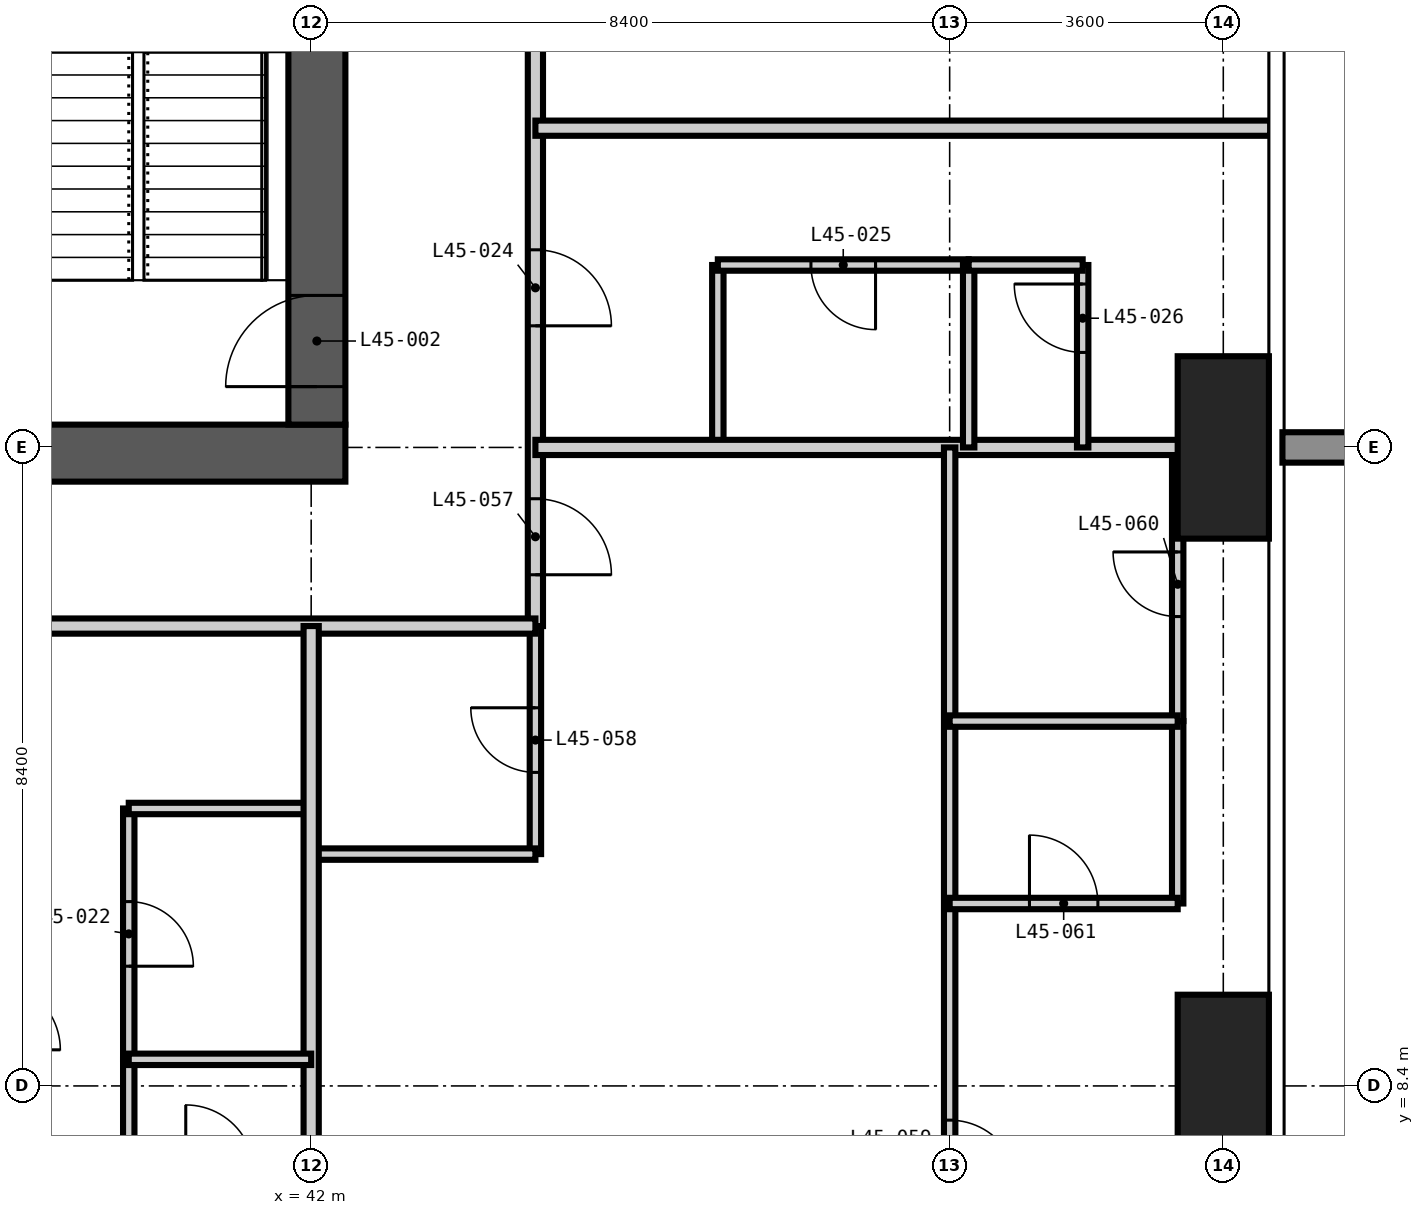
"""IFC4 building model, lengths in metres.
Left out: names, types, materials, properties, quantities, classifications, styles, units other than length and angle.
Written with IfcOpenShell. Run it as: python <this file> out.ifc"""

import sys

from ifc_helpers import new_model, si_unit, direction, frame, frame_2d, origin, origin_2d, place, context, subcontext, project, spatial, rectangle, extrude, element, fill, save


model = new_model("IFC4")
c1 = context("Model", 3, precision=1e-05, world=origin(), true_north=direction((0.0, 1.0)))
c2 = subcontext(c1, "Body", "Model", "MODEL_VIEW")
j1 = project(units=[si_unit("LENGTHUNIT", "METRE"), si_unit("PLANEANGLEUNIT", "RADIAN")], contexts=[c1])
p1 = place(None, origin())
s1 = spatial("IfcSite", under=j1, at=p1, CompositionType="ELEMENT")
p2 = place(p1, origin())
s2 = spatial("IfcBuilding", under=s1, at=p2, CompositionType="ELEMENT")
p3 = place(p2, frame((0.0, 0.0, 177.0)))
s3 = spatial("IfcBuildingStorey", under=s2, at=p3, CompositionType="ELEMENT", Elevation=177.0)
for number, where, z_axis, x_axis in (
    (1, (54.0, 8.4, -0.35), (0.0, 0.0, 1.0), (1.0, 0.0, 0.0)),
    (2, (54.0, 16.8, -0.35), (0.0, 0.0, 1.0), (1.0, 0.0, 0.0)),
):
    element("IfcColumn", number, at=place(p3, frame(where, z_axis=z_axis, x_axis=x_axis)), inside=s3, PredefinedType="COLUMN", context=c2, shape_type="SweptSolid", body=[
        extrude(rectangle(XDim=1.2, YDim=2.4, at=origin_2d()), origin(), (0.0, 0.0, 1.0), 3.6),
    ])
p4 = place(p3, frame((16.35, 16.725, -0.35), z_axis=(0.0, 0.0, 1.0), x_axis=(1.0, 0.0, 0.0)))
e3 = element("IfcWall", 3, at=p4, inside=s3, PredefinedType="SHEAR", context=c2, shape_type="SweptSolid", body=[
    extrude(rectangle(XDim=26.1, YDim=0.75, at=frame_2d((13.05, 0.0))), origin(), (0.0, 0.0, 1.0), 3.6),
])
p5 = place(p4, frame((12.55, 0.0, 0.35)))
e4 = element("IfcOpeningElement", 4, at=p5, cuts=e3, PredefinedType="OPENING", context=c2, shape_type="SweptSolid", body=[
    extrude(rectangle(XDim=1.0, YDim=2.1, at=frame_2d((0.5, 1.05))), frame((0.0, 0.385, 0.0), z_axis=(0.0, -1.0, 0.0), x_axis=(1.0, 0.0, 0.0)), (0.0, 0.0, 1.0), 0.77),
])
p6 = place(p4, frame((18.85, 0.0, 0.35)))
e5 = element("IfcOpeningElement", 5, at=p6, cuts=e3, PredefinedType="OPENING", context=c2, shape_type="SweptSolid", body=[
    extrude(rectangle(XDim=1.0, YDim=2.1, at=frame_2d((0.5, 1.05))), frame((0.0, 0.385, 0.0), z_axis=(0.0, -1.0, 0.0), x_axis=(1.0, 0.0, 0.0)), (0.0, 0.0, 1.0), 0.77),
])
p7 = place(p3, frame((42.075, 17.1, -0.35), z_axis=(0.0, 0.0, 1.0), x_axis=(0.0, 1.0, 0.0)))
e6 = element("IfcWall", 6, at=p7, inside=s3, PredefinedType="SHEAR", context=c2, shape_type="SweptSolid", body=[
    extrude(rectangle(XDim=24.6, YDim=0.75, at=frame_2d((12.3, 0.0))), origin(), (0.0, 0.0, 1.0), 3.6),
])
p8 = place(p7, frame((0.5, 0.0, 0.35)))
e7 = element("IfcOpeningElement", 7, at=p8, cuts=e6, PredefinedType="OPENING", context=c2, shape_type="SweptSolid", body=[
    extrude(rectangle(XDim=1.2, YDim=2.2, at=frame_2d((0.6, 1.1))), frame((0.0, 0.385, 0.0), z_axis=(0.0, -1.0, 0.0), x_axis=(1.0, 0.0, 0.0)), (0.0, 0.0, 1.0), 0.77),
])
p9 = place(p7, frame((11.8, 0.0, 0.35)))
e8 = element("IfcOpeningElement", 8, at=p9, cuts=e6, PredefinedType="OPENING", context=c2, shape_type="SweptSolid", body=[
    extrude(rectangle(XDim=1.0, YDim=2.1, at=frame_2d((0.5, 1.05))), frame((0.0, 0.385, 0.0), z_axis=(0.0, -1.0, 0.0), x_axis=(1.0, 0.0, 0.0)), (0.0, 0.0, 1.0), 0.77),
])
p10 = place(p7, frame((20.2, 0.0, 0.35)))
e9 = element("IfcOpeningElement", 9, at=p10, cuts=e6, PredefinedType="OPENING", context=c2, shape_type="SweptSolid", body=[
    extrude(rectangle(XDim=1.0, YDim=2.1, at=frame_2d((0.5, 1.05))), frame((0.0, 0.385, 0.0), z_axis=(0.0, -1.0, 0.0), x_axis=(1.0, 0.0, 0.0)), (0.0, 0.0, 1.0), 0.77),
])
p11 = place(p3, frame((39.6, 8.75, 0.0), z_axis=(0.0, 0.0, 1.0), x_axis=(0.0, 1.0, 0.0)))
e10 = element("IfcWall", 10, at=p11, inside=s3, PredefinedType="PARTITIONING", context=c2, shape_type="SweptSolid", body=[
    extrude(rectangle(XDim=3.3, YDim=0.15, at=frame_2d((1.65, 0.0))), origin(), (0.0, 0.0, 1.0), 3.25),
])
p12 = place(p11, frame((1.225, 0.0, 0.0)))
e11 = element("IfcOpeningElement", 11, at=p12, cuts=e10, PredefinedType="OPENING", context=c2, shape_type="SweptSolid", body=[
    extrude(rectangle(XDim=0.85, YDim=2.1, at=frame_2d((0.425, 1.05))), frame((0.0, 0.085, 0.0), z_axis=(0.0, -1.0, 0.0), x_axis=(1.0, 0.0, 0.0)), (0.0, 0.0, 1.0), 0.17),
])
p13 = place(p3, frame((44.95, 11.45, 0.0), z_axis=(0.0, 0.0, 1.0), x_axis=(0.0, 1.0, 0.0)))
e12 = element("IfcWall", 12, at=p13, inside=s3, PredefinedType="PARTITIONING", context=c2, shape_type="SweptSolid", body=[
    extrude(rectangle(XDim=3.0, YDim=0.15, at=frame_2d((1.5, 0.0))), origin(), (0.0, 0.0, 1.0), 3.25),
])
p14 = place(p13, frame((1.075, 0.0, 0.0)))
e13 = element("IfcOpeningElement", 13, at=p14, cuts=e12, PredefinedType="OPENING", context=c2, shape_type="SweptSolid", body=[
    extrude(rectangle(XDim=0.85, YDim=2.1, at=frame_2d((0.425, 1.05))), frame((0.0, 0.085, 0.0), z_axis=(0.0, -1.0, 0.0), x_axis=(1.0, 0.0, 0.0)), (0.0, 0.0, 1.0), 0.17),
])
p15 = place(p3, frame((47.35, 16.8, 0.0), z_axis=(0.0, 0.0, 1.0), x_axis=(0.0, 1.0, 0.0)))
e14 = element("IfcWall", 14, at=p15, inside=s3, PredefinedType="PARTITIONING", context=c2, shape_type="SweptSolid", body=[
    extrude(rectangle(XDim=2.4, YDim=0.15, at=frame_2d((1.2, 0.0))), origin(), (0.0, 0.0, 1.0), 3.25),
])
p16 = place(p3, frame((53.4, 13.2, 0.0), z_axis=(0.0, 0.0, 1.0), x_axis=(0.0, 1.0, 0.0)))
e15 = element("IfcWall", 15, at=p16, inside=s3, PredefinedType="PARTITIONING", context=c2, shape_type="SweptSolid", body=[
    extrude(rectangle(XDim=3.6, YDim=0.15, at=frame_2d((1.8, 0.0))), origin(), (0.0, 0.0, 1.0), 3.25),
])
p17 = place(p16, frame((1.375, 0.0, 0.0)))
e16 = element("IfcOpeningElement", 16, at=p17, cuts=e15, PredefinedType="OPENING", context=c2, shape_type="SweptSolid", body=[
    extrude(rectangle(XDim=0.85, YDim=2.1, at=frame_2d((0.425, 1.05))), frame((0.0, 0.085, 0.0), z_axis=(0.0, -1.0, 0.0), x_axis=(1.0, 0.0, 0.0)), (0.0, 0.0, 1.0), 0.17),
])
p18 = place(p3, frame((42.0, 11.45, 0.0), z_axis=(0.0, 0.0, 1.0), x_axis=(1.0, 0.0, 0.0)))
e17 = element("IfcWall", 17, at=p18, inside=s3, PredefinedType="PARTITIONING", context=c2, shape_type="SweptSolid", body=[
    extrude(rectangle(XDim=2.95, YDim=0.15, at=frame_2d((1.475, 0.0))), origin(), (0.0, 0.0, 1.0), 3.25),
])
p19 = place(p3, frame((39.6, 12.05, 0.0), z_axis=(0.0, 0.0, 1.0), x_axis=(1.0, 0.0, 0.0)))
e18 = element("IfcWall", 18, at=p19, inside=s3, PredefinedType="PARTITIONING", context=c2, shape_type="SweptSolid", body=[
    extrude(rectangle(XDim=2.4, YDim=0.15, at=frame_2d((1.2, 0.0))), origin(), (0.0, 0.0, 1.0), 3.25),
])
p20 = place(p3, frame((47.35, 19.2, 0.0), z_axis=(0.0, 0.0, 1.0), x_axis=(1.0, 0.0, 0.0)))
e19 = element("IfcWall", 19, at=p20, inside=s3, PredefinedType="PARTITIONING", context=c2, shape_type="SweptSolid", body=[
    extrude(rectangle(XDim=3.3, YDim=0.15, at=frame_2d((1.65, 0.0))), origin(), (0.0, 0.0, 1.0), 3.25),
])
p21 = place(p20, frame((1.225, 0.0, 0.0)))
e20 = element("IfcOpeningElement", 20, at=p21, cuts=e19, PredefinedType="OPENING", context=c2, shape_type="SweptSolid", body=[
    extrude(rectangle(XDim=0.85, YDim=2.1, at=frame_2d((0.425, 1.05))), frame((0.0, 0.085, 0.0), z_axis=(0.0, -1.0, 0.0), x_axis=(1.0, 0.0, 0.0)), (0.0, 0.0, 1.0), 0.17),
])
p22 = place(p3, frame((44.95, 45.55, 0.0), z_axis=(0.0, 0.0, 1.0), x_axis=(0.0, -1.0, 0.0)))
e21 = element("IfcWall", 21, at=p22, inside=s3, PredefinedType="PARTITIONING", context=c2, shape_type="SweptSolid", body=[
    extrude(rectangle(XDim=31.1, YDim=0.2, at=frame_2d((15.55, 0.0))), origin(), (0.0, 0.0, 1.0), 3.25),
])
p23 = place(p22, frame((26.15, 0.0, 0.0)))
e22 = element("IfcOpeningElement", 22, at=p23, cuts=e21, PredefinedType="OPENING", context=c2, shape_type="SweptSolid", body=[
    extrude(rectangle(XDim=1.0, YDim=2.2, at=frame_2d((0.5, 1.1))), frame((0.0, 0.11, 0.0), z_axis=(0.0, -1.0, 0.0), x_axis=(1.0, 0.0, 0.0)), (0.0, 0.0, 1.0), 0.22),
])
p24 = place(p22, frame((21.95, 0.0, 0.0)))
e23 = element("IfcOpeningElement", 23, at=p24, cuts=e21, PredefinedType="OPENING", context=c2, shape_type="SweptSolid", body=[
    extrude(rectangle(XDim=1.0, YDim=2.2, at=frame_2d((0.5, 1.1))), frame((0.0, 0.11, 0.0), z_axis=(0.0, -1.0, 0.0), x_axis=(1.0, 0.0, 0.0)), (0.0, 0.0, 1.0), 0.22),
])
p25 = place(p22, frame((17.75, 0.0, 0.0)))
e24 = element("IfcOpeningElement", 24, at=p25, cuts=e21, PredefinedType="OPENING", context=c2, shape_type="SweptSolid", body=[
    extrude(rectangle(XDim=1.0, YDim=2.2, at=frame_2d((0.5, 1.1))), frame((0.0, 0.11, 0.0), z_axis=(0.0, -1.0, 0.0), x_axis=(1.0, 0.0, 0.0)), (0.0, 0.0, 1.0), 0.22),
])
p26 = place(p22, frame((13.55, 0.0, 0.0)))
e25 = element("IfcOpeningElement", 25, at=p26, cuts=e21, PredefinedType="OPENING", context=c2, shape_type="SweptSolid", body=[
    extrude(rectangle(XDim=1.0, YDim=2.2, at=frame_2d((0.5, 1.1))), frame((0.0, 0.11, 0.0), z_axis=(0.0, -1.0, 0.0), x_axis=(1.0, 0.0, 0.0)), (0.0, 0.0, 1.0), 0.22),
])
p27 = place(p22, frame((9.35, 0.0, 0.0)))
e26 = element("IfcOpeningElement", 26, at=p27, cuts=e21, PredefinedType="OPENING", context=c2, shape_type="SweptSolid", body=[
    extrude(rectangle(XDim=1.0, YDim=2.2, at=frame_2d((0.5, 1.1))), frame((0.0, 0.11, 0.0), z_axis=(0.0, -1.0, 0.0), x_axis=(1.0, 0.0, 0.0)), (0.0, 0.0, 1.0), 0.22),
])
p28 = place(p22, frame((5.15, 0.0, 0.0)))
e27 = element("IfcOpeningElement", 27, at=p28, cuts=e21, PredefinedType="OPENING", context=c2, shape_type="SweptSolid", body=[
    extrude(rectangle(XDim=1.0, YDim=2.2, at=frame_2d((0.5, 1.1))), frame((0.0, 0.11, 0.0), z_axis=(0.0, -1.0, 0.0), x_axis=(1.0, 0.0, 0.0)), (0.0, 0.0, 1.0), 0.22),
])
p29 = place(p22, frame((29.425, 0.0, 0.0)))
e28 = element("IfcOpeningElement", 28, at=p29, cuts=e21, PredefinedType="OPENING", context=c2, shape_type="SweptSolid", body=[
    extrude(rectangle(XDim=1.0, YDim=2.2, at=frame_2d((0.5, 1.1))), frame((0.0, 0.11, 0.0), z_axis=(0.0, -1.0, 0.0), x_axis=(1.0, 0.0, 0.0)), (0.0, 0.0, 1.0), 0.22),
])
p30 = place(p22, frame((1.275, 0.0, 0.0)))
e29 = element("IfcOpeningElement", 29, at=p30, cuts=e21, PredefinedType="OPENING", context=c2, shape_type="SweptSolid", body=[
    extrude(rectangle(XDim=1.0, YDim=2.2, at=frame_2d((0.5, 1.1))), frame((0.0, 0.11, 0.0), z_axis=(0.0, -1.0, 0.0), x_axis=(1.0, 0.0, 0.0)), (0.0, 0.0, 1.0), 0.22),
])
p31 = place(p3, frame((44.95, 14.45, 0.0), z_axis=(0.0, 0.0, 1.0), x_axis=(-1.0, 0.0, 0.0)))
e30 = element("IfcWall", 30, at=p31, inside=s3, PredefinedType="PARTITIONING", context=c2, shape_type="SweptSolid", body=[
    extrude(rectangle(XDim=30.5, YDim=0.2, at=frame_2d((15.25, 0.0))), origin(), (0.0, 0.0, 1.0), 3.25),
])
p32 = place(p31, frame((24.65, 0.0, 0.0)))
e31 = element("IfcOpeningElement", 31, at=p32, cuts=e30, PredefinedType="OPENING", context=c2, shape_type="SweptSolid", body=[
    extrude(rectangle(XDim=1.0, YDim=2.2, at=frame_2d((0.5, 1.1))), frame((0.0, 0.11, 0.0), z_axis=(0.0, -1.0, 0.0), x_axis=(1.0, 0.0, 0.0)), (0.0, 0.0, 1.0), 0.22),
])
p33 = place(p31, frame((13.85, 0.0, 0.0)))
e32 = element("IfcOpeningElement", 32, at=p33, cuts=e30, PredefinedType="OPENING", context=c2, shape_type="SweptSolid", body=[
    extrude(rectangle(XDim=1.0, YDim=2.2, at=frame_2d((0.5, 1.1))), frame((0.0, 0.11, 0.0), z_axis=(0.0, -1.0, 0.0), x_axis=(1.0, 0.0, 0.0)), (0.0, 0.0, 1.0), 0.22),
])
p34 = place(p31, frame((7.85, 0.0, 0.0)))
e33 = element("IfcOpeningElement", 33, at=p34, cuts=e30, PredefinedType="OPENING", context=c2, shape_type="SweptSolid", body=[
    extrude(rectangle(XDim=1.0, YDim=2.2, at=frame_2d((0.5, 1.1))), frame((0.0, 0.11, 0.0), z_axis=(0.0, -1.0, 0.0), x_axis=(1.0, 0.0, 0.0)), (0.0, 0.0, 1.0), 0.22),
])
p35 = place(p3, frame((42.0, 4.182, 0.0), z_axis=(0.0, 0.0, 1.0), x_axis=(0.0, 1.0, 0.0)))
e34 = element("IfcWall", 34, at=p35, inside=s3, PredefinedType="PARTITIONING", context=c2, shape_type="SweptSolid", body=[
    extrude(rectangle(XDim=10.268, YDim=0.2, at=frame_2d((5.134, 0.0))), origin(), (0.0, 0.0, 1.0), 3.25),
])
for number, where, z_axis, x_axis in (
    (35, (44.95, 16.8, 0.0), (0.0, 0.0, 1.0), (1.0, 0.0, 0.0)),
    (36, (44.95, 21.0, 0.0), (0.0, 0.0, 1.0), (1.0, 0.0, 0.0)),
):
    element("IfcWall", number, at=place(p3, frame(where, z_axis=z_axis, x_axis=x_axis)), inside=s3, PredefinedType="PARTITIONING", context=c2, shape_type="SweptSolid", body=[
        extrude(rectangle(XDim=9.668, YDim=0.2, at=frame_2d((4.834, 0.0))), origin(), (0.0, 0.0, 1.0), 3.25),
    ])
p36 = place(p3, frame((39.6, 7.25, 0.0), z_axis=(0.0, 0.0, 1.0), x_axis=(0.0, 1.0, 0.0)))
e37 = element("IfcWall", 37, at=p36, inside=s3, PredefinedType="PARTITIONING", context=c2, shape_type="SweptSolid", body=[
    extrude(rectangle(XDim=1.5, YDim=0.15, at=frame_2d((0.75, 0.0))), origin(), (0.0, 0.0, 1.0), 3.25),
])
p37 = place(p3, frame((50.4, 4.182, 0.0), z_axis=(0.0, 0.0, 1.0), x_axis=(0.0, 1.0, 0.0)))
e38 = element("IfcWall", 38, at=p37, inside=s3, PredefinedType="PARTITIONING", context=c2, shape_type="SweptSolid", body=[
    extrude(rectangle(XDim=12.618, YDim=0.15, at=frame_2d((6.309, 0.0))), origin(), (0.0, 0.0, 1.0), 3.25),
])
p38 = place(p37, frame((2.868, 0.0, 0.0)))
e39 = element("IfcOpeningElement", 39, at=p38, cuts=e38, PredefinedType="OPENING", context=c2, shape_type="SweptSolid", body=[
    extrude(rectangle(XDim=0.9, YDim=2.1, at=frame_2d((0.45, 1.05))), frame((0.0, 0.085, 0.0), z_axis=(0.0, -1.0, 0.0), x_axis=(1.0, 0.0, 0.0)), (0.0, 0.0, 1.0), 0.17),
])
p39 = place(p3, frame((50.65, 16.8, 0.0), z_axis=(0.0, 0.0, 1.0), x_axis=(0.0, 1.0, 0.0)))
e40 = element("IfcWall", 40, at=p39, inside=s3, PredefinedType="PARTITIONING", context=c2, shape_type="SweptSolid", body=[
    extrude(rectangle(XDim=2.4, YDim=0.15, at=frame_2d((1.2, 0.0))), origin(), (0.0, 0.0, 1.0), 3.25),
])
p40 = place(p3, frame((52.15, 16.8, 0.0), z_axis=(0.0, 0.0, 1.0), x_axis=(0.0, 1.0, 0.0)))
e41 = element("IfcWall", 41, at=p40, inside=s3, PredefinedType="PARTITIONING", context=c2, shape_type="SweptSolid", body=[
    extrude(rectangle(XDim=2.4, YDim=0.15, at=frame_2d((1.2, 0.0))), origin(), (0.0, 0.0, 1.0), 3.25),
])
p41 = place(p40, frame((1.25, 0.0, 0.0)))
e42 = element("IfcOpeningElement", 42, at=p41, cuts=e41, PredefinedType="OPENING", context=c2, shape_type="SweptSolid", body=[
    extrude(rectangle(XDim=0.9, YDim=2.1, at=frame_2d((0.45, 1.05))), frame((0.0, 0.085, 0.0), z_axis=(0.0, -1.0, 0.0), x_axis=(1.0, 0.0, 0.0)), (0.0, 0.0, 1.0), 0.17),
])
for number, where, z_axis, x_axis in (
    (43, (53.4, 10.8, 0.0), (0.0, 0.0, 1.0), (0.0, 1.0, 0.0)),
    (44, (39.6, 8.75, 0.0), (0.0, 0.0, 1.0), (1.0, 0.0, 0.0)),
):
    element("IfcWall", number, at=place(p3, frame(where, z_axis=z_axis, x_axis=x_axis)), inside=s3, PredefinedType="PARTITIONING", context=c2, shape_type="SweptSolid", body=[
        extrude(rectangle(XDim=2.4, YDim=0.15, at=frame_2d((1.2, 0.0))), origin(), (0.0, 0.0, 1.0), 3.25),
    ])
p42 = place(p3, frame((50.4, 10.8, 0.0), z_axis=(0.0, 0.0, 1.0), x_axis=(1.0, 0.0, 0.0)))
e45 = element("IfcWall", 45, at=p42, inside=s3, PredefinedType="PARTITIONING", context=c2, shape_type="SweptSolid", body=[
    extrude(rectangle(XDim=3.0, YDim=0.15, at=frame_2d((1.5, 0.0))), origin(), (0.0, 0.0, 1.0), 3.25),
])
p43 = place(p42, frame((1.05, 0.0, 0.0)))
e46 = element("IfcOpeningElement", 46, at=p43, cuts=e45, PredefinedType="OPENING", context=c2, shape_type="SweptSolid", body=[
    extrude(rectangle(XDim=0.9, YDim=2.1, at=frame_2d((0.45, 1.05))), frame((0.0, 0.085, 0.0), z_axis=(0.0, -1.0, 0.0), x_axis=(1.0, 0.0, 0.0)), (0.0, 0.0, 1.0), 0.17),
])
p44 = place(p3, frame((50.4, 13.2, 0.0), z_axis=(0.0, 0.0, 1.0), x_axis=(1.0, 0.0, 0.0)))
e47 = element("IfcWall", 47, at=p44, inside=s3, PredefinedType="PARTITIONING", context=c2, shape_type="SweptSolid", body=[
    extrude(rectangle(XDim=3.0, YDim=0.15, at=frame_2d((1.5, 0.0))), origin(), (0.0, 0.0, 1.0), 3.25),
])
p45 = place(p3, frame((50.65, 19.2, 0.0), z_axis=(0.0, 0.0, 1.0), x_axis=(1.0, 0.0, 0.0)))
e48 = element("IfcWall", 48, at=p45, inside=s3, PredefinedType="PARTITIONING", context=c2, shape_type="SweptSolid", body=[
    extrude(rectangle(XDim=1.5, YDim=0.15, at=frame_2d((0.75, 0.0))), origin(), (0.0, 0.0, 1.0), 3.25),
])
p46 = place(p8, origin())
e49 = element("IfcDoor", 49, at=p46, inside=s3, OperationType="SINGLE_SWING_LEFT", PredefinedType="DOOR", context=c2, shape_type="SweptSolid", body=[
    extrude(rectangle(XDim=1.2, YDim=2.2, at=frame_2d((0.6, 1.1))), frame((0.0, 0.025, 0.0), z_axis=(0.0, -1.0, 0.0), x_axis=(1.0, 0.0, 0.0)), (0.0, 0.0, 1.0), 0.05),
])
fill(e7, e49)
p47 = place(p12, frame((0.85, 0.0, 0.0), z_axis=(0.0, 0.0, 1.0), x_axis=(-1.0, 0.0, 0.0)))
e50 = element("IfcDoor", 50, at=p47, inside=s3, OperationType="SINGLE_SWING_RIGHT", PredefinedType="DOOR", context=c2, shape_type="SweptSolid", body=[
    extrude(rectangle(XDim=0.85, YDim=2.1, at=frame_2d((0.425, 1.05))), frame((0.0, 0.025, 0.0), z_axis=(0.0, -1.0, 0.0), x_axis=(1.0, 0.0, 0.0)), (0.0, 0.0, 1.0), 0.05),
])
fill(e11, e50)
p48 = place(p23, origin())
e51 = element("IfcDoor", 51, at=p48, inside=s3, OperationType="SINGLE_SWING_RIGHT", PredefinedType="DOOR", context=c2, shape_type="SweptSolid", body=[
    extrude(rectangle(XDim=1.0, YDim=2.2, at=frame_2d((0.5, 1.1))), frame((0.0, 0.025, 0.0), z_axis=(0.0, -1.0, 0.0), x_axis=(1.0, 0.0, 0.0)), (0.0, 0.0, 1.0), 0.05),
])
fill(e22, e51)
p49 = place(p21, frame((0.85, 0.0, 0.0), z_axis=(0.0, 0.0, 1.0), x_axis=(-1.0, 0.0, 0.0)))
e52 = element("IfcDoor", 52, at=p49, inside=s3, OperationType="SINGLE_SWING_LEFT", PredefinedType="DOOR", context=c2, shape_type="SweptSolid", body=[
    extrude(rectangle(XDim=0.85, YDim=2.1, at=frame_2d((0.425, 1.05))), frame((0.0, 0.025, 0.0), z_axis=(0.0, -1.0, 0.0), x_axis=(1.0, 0.0, 0.0)), (0.0, 0.0, 1.0), 0.05),
])
fill(e20, e52)
p50 = place(p41, origin())
e53 = element("IfcDoor", 53, at=p50, inside=s3, OperationType="SINGLE_SWING_RIGHT", PredefinedType="DOOR", context=c2, shape_type="SweptSolid", body=[
    extrude(rectangle(XDim=0.9, YDim=2.1, at=frame_2d((0.45, 1.05))), frame((0.0, 0.025, 0.0), z_axis=(0.0, -1.0, 0.0), x_axis=(1.0, 0.0, 0.0)), (0.0, 0.0, 1.0), 0.05),
])
fill(e42, e53)
p51 = place(p29, origin())
e54 = element("IfcDoor", 54, at=p51, inside=s3, OperationType="SINGLE_SWING_RIGHT", PredefinedType="DOOR", context=c2, shape_type="SweptSolid", body=[
    extrude(rectangle(XDim=1.0, YDim=2.2, at=frame_2d((0.5, 1.1))), frame((0.0, 0.025, 0.0), z_axis=(0.0, -1.0, 0.0), x_axis=(1.0, 0.0, 0.0)), (0.0, 0.0, 1.0), 0.05),
])
fill(e28, e54)
p52 = place(p14, origin())
e55 = element("IfcDoor", 55, at=p52, inside=s3, OperationType="SINGLE_SWING_RIGHT", PredefinedType="DOOR", context=c2, shape_type="SweptSolid", body=[
    extrude(rectangle(XDim=0.85, YDim=2.1, at=frame_2d((0.425, 1.05))), frame((0.0, 0.025, 0.0), z_axis=(0.0, -1.0, 0.0), x_axis=(1.0, 0.0, 0.0)), (0.0, 0.0, 1.0), 0.05),
])
fill(e13, e55)
p53 = place(p38, frame((0.9, 0.0, 0.0), z_axis=(0.0, 0.0, 1.0), x_axis=(-1.0, 0.0, 0.0)))
e56 = element("IfcDoor", 56, at=p53, inside=s3, OperationType="SINGLE_SWING_RIGHT", PredefinedType="DOOR", context=c2, shape_type="SweptSolid", body=[
    extrude(rectangle(XDim=0.9, YDim=2.1, at=frame_2d((0.45, 1.05))), frame((0.0, 0.025, 0.0), z_axis=(0.0, -1.0, 0.0), x_axis=(1.0, 0.0, 0.0)), (0.0, 0.0, 1.0), 0.05),
])
fill(e39, e56)
p54 = place(p17, origin())
e57 = element("IfcDoor", 57, at=p54, inside=s3, OperationType="SINGLE_SWING_RIGHT", PredefinedType="DOOR", context=c2, shape_type="SweptSolid", body=[
    extrude(rectangle(XDim=0.85, YDim=2.1, at=frame_2d((0.425, 1.05))), frame((0.0, 0.025, 0.0), z_axis=(0.0, -1.0, 0.0), x_axis=(1.0, 0.0, 0.0)), (0.0, 0.0, 1.0), 0.05),
])
fill(e16, e57)
p55 = place(p43, origin())
e58 = element("IfcDoor", 58, at=p55, inside=s3, OperationType="SINGLE_SWING_LEFT", PredefinedType="DOOR", context=c2, shape_type="SweptSolid", body=[
    extrude(rectangle(XDim=0.9, YDim=2.1, at=frame_2d((0.45, 1.05))), frame((0.0, 0.025, 0.0), z_axis=(0.0, -1.0, 0.0), x_axis=(1.0, 0.0, 0.0)), (0.0, 0.0, 1.0), 0.05),
])
fill(e46, e58)
save(model, sys.argv[1])
